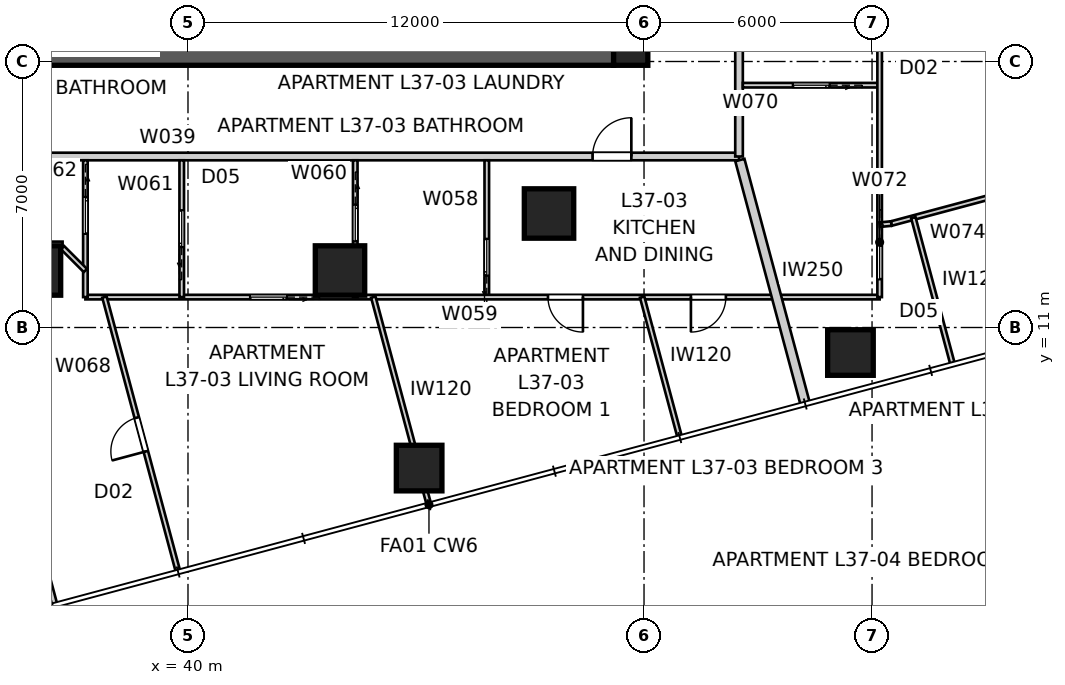
"""IFC4 building model, lengths in metres.
Left out: names, types, materials, properties, quantities, classifications, styles, units other than length and angle.
Written with IfcOpenShell. Run it as: python <this file> out.ifc"""

import sys

from ifc_helpers import new_model, si_unit, direction, frame, frame_2d, origin, origin_2d, place, context, subcontext, project, spatial, polyline, rectangle, outline, extrude, element, fill, save


model = new_model("IFC4")
c1 = context("Model", 3, precision=1e-05, world=origin(), true_north=direction((0.0, 1.0)))
c2 = subcontext(c1, "Body", "Model", "MODEL_VIEW")
j1 = project(units=[si_unit("LENGTHUNIT", "METRE"), si_unit("PLANEANGLEUNIT", "RADIAN")], contexts=[c1])
p1 = place(None, origin())
s1 = spatial("IfcSite", under=j1, at=p1, CompositionType="ELEMENT")
p2 = place(p1, origin())
s2 = spatial("IfcBuilding", under=s1, at=p2, CompositionType="ELEMENT")
p3 = place(p2, frame((0.0, 0.0, 135.4)))
s3 = spatial("IfcBuildingStorey", under=s2, at=p3, CompositionType="ELEMENT", Elevation=135.4)
p4 = place(p3, frame((51.2, 18.35, 0.0), z_axis=(0.0, 0.0, 1.0), x_axis=(-1.0, 0.0, 0.0)))
e1 = element("IfcWall", 1, at=p4, inside=s3, PredefinedType="SHEAR", context=c2, shape_type="SweptSolid", body=[
    extrude(outline(polyline([(0.0, -0.45), (22.4, -0.45), (22.4, -0.025), (22.85, -0.025), (22.85, 0.025), (22.4, 0.025), (22.4, 0.45), (0.0, 0.45), (0.0, 0.025), (-0.45, 0.025), (-0.45, -0.025), (0.0, -0.025), (0.0, -0.45)])), origin(), (0.0, 0.0, 1.0), 3.4),
])
p5 = place(p3, frame((51.65, 18.35, 0.0), z_axis=(0.0, 0.0, 1.0), x_axis=(1.0, 0.0, 0.0)))
e2 = element("IfcColumn", 2, at=p5, inside=s3, PredefinedType="COLUMN", context=c2, shape_type="SweptSolid", body=[
    extrude(rectangle(XDim=0.9, YDim=0.9, at=origin_2d()), origin(), (0.0, 0.0, 1.0), 3.4),
])
for number, where, z_axis, x_axis in (
    (3, (46.082, 7.301, 0.0), (0.0, 0.0, 1.0), (1.0, 0.0, 0.0)),
    (4, (57.432, 10.342, 0.0), (0.0, 0.0, 1.0), (1.0, 0.0, 0.0)),
):
    element("IfcColumn", number, at=place(p3, frame(where, z_axis=z_axis, x_axis=x_axis)), inside=s3, PredefinedType="COLUMN", context=c2, shape_type="SweptSolid", body=[
        extrude(rectangle(XDim=1.2, YDim=1.2, at=origin_2d()), origin(), (0.0, 0.0, 1.0), 3.2),
    ])
for number, where, z_axis, x_axis in (
    (5, (36.0, 12.5, 0.0), (0.0, 0.0, 1.0), (1.0, 0.0, 0.0)),
    (6, (44.0, 12.5, 0.0), (0.0, 0.0, 1.0), (1.0, 0.0, 0.0)),
    (7, (49.5, 14.0, 0.0), (0.0, 0.0, 1.0), (1.0, 0.0, 0.0)),
):
    element("IfcColumn", number, at=place(p3, frame(where, z_axis=z_axis, x_axis=x_axis)), inside=s3, PredefinedType="COLUMN", context=c2, shape_type="SweptSolid", body=[
        extrude(rectangle(XDim=1.3, YDim=1.3, at=origin_2d()), origin(), (0.0, 0.0, 1.0), 3.4),
    ])
p6 = place(p3, frame((25.5, 15.5, 0.0), z_axis=(0.0, 0.0, 1.0), x_axis=(1.0, 0.0, 0.0)))
e8 = element("IfcWall", 8, at=p6, inside=s3, PredefinedType="PARTITIONING", context=c2, shape_type="SweptSolid", body=[
    extrude(rectangle(XDim=29.0, YDim=0.2, at=frame_2d((14.5, 0.0))), origin(), (0.0, 0.0, 1.0), 3.2),
])
p7 = place(p6, frame((25.146, 0.0, 0.0)))
e9 = element("IfcOpeningElement", 9, at=p7, cuts=e8, PredefinedType="OPENING", context=c2, shape_type="SweptSolid", body=[
    extrude(rectangle(XDim=1.02, YDim=2.0, at=frame_2d((0.51, 1.0))), frame((0.0, 0.11, 0.0), z_axis=(0.0, -1.0, 0.0), x_axis=(1.0, 0.0, 0.0)), (0.0, 0.0, 1.0), 0.22),
])
p8 = place(p6, frame((1.761, 0.0, 0.0)))
e10 = element("IfcOpeningElement", 10, at=p8, cuts=e8, PredefinedType="OPENING", context=c2, shape_type="SweptSolid", body=[
    extrude(rectangle(XDim=1.02, YDim=2.34, at=frame_2d((0.51, 1.17))), frame((0.0, 0.11, 0.0), z_axis=(0.0, -1.0, 0.0), x_axis=(1.0, 0.0, 0.0)), (0.0, 0.0, 1.0), 0.22),
])
p9 = place(p3, frame((54.5, 15.5, 0.0), z_axis=(0.0, 0.0, 1.0), x_axis=(0.0, 1.0, 0.0)))
e11 = element("IfcWall", 11, at=p9, inside=s3, PredefinedType="PARTITIONING", context=c2, shape_type="SweptSolid", body=[
    extrude(rectangle(XDim=28.2, YDim=0.2, at=frame_2d((14.1, 0.0))), origin(), (0.0, 0.0, 1.0), 3.2),
])
p10 = place(p9, frame((21.527, 0.0, 0.0)))
e12 = element("IfcOpeningElement", 12, at=p10, cuts=e11, PredefinedType="OPENING", context=c2, shape_type="SweptSolid", body=[
    extrude(rectangle(XDim=1.02, YDim=2.34, at=frame_2d((0.51, 1.17))), frame((0.0, 0.11, 0.0), z_axis=(0.0, -1.0, 0.0), x_axis=(1.0, 0.0, 0.0)), (0.0, 0.0, 1.0), 0.22),
])
p11 = place(p9, frame((5.806, 0.0, 0.0)))
e13 = element("IfcOpeningElement", 13, at=p11, cuts=e11, PredefinedType="OPENING", context=c2, shape_type="SweptSolid", body=[
    extrude(rectangle(XDim=1.02, YDim=2.34, at=frame_2d((0.51, 1.17))), frame((0.0, 0.11, 0.0), z_axis=(0.0, -1.0, 0.0), x_axis=(1.0, 0.0, 0.0)), (0.0, 0.0, 1.0), 0.22),
])
p12 = place(p9, frame((26.127, 0.0, 0.0)))
e14 = element("IfcOpeningElement", 14, at=p12, cuts=e11, PredefinedType="OPENING", context=c2, shape_type="SweptSolid", body=[
    extrude(rectangle(XDim=1.02, YDim=2.34, at=frame_2d((0.51, 1.17))), frame((0.0, 0.11, 0.0), z_axis=(0.0, -1.0, 0.0), x_axis=(1.0, 0.0, 0.0)), (0.0, 0.0, 1.0), 0.22),
])
p13 = place(p3, frame((36.44, 3.682, 0.0), z_axis=(0.0, 0.0, 1.0), x_axis=(-0.258824223352, 0.965924438766, 0.0)))
e15 = element("IfcWall", 15, at=p13, inside=s3, PredefinedType="PARTITIONING", context=c2, shape_type="SweptSolid", body=[
    extrude(rectangle(XDim=12.138, YDim=0.25, at=frame_2d((6.069, 0.0))), origin(), (0.0, 0.0, 1.0), 3.2),
])
p14 = place(p3, frame((56.242, 8.988, 0.0), z_axis=(0.0, 0.0, 1.0), x_axis=(-0.25880587229, 0.965929355837, 0.0)))
e16 = element("IfcWall", 16, at=p14, inside=s3, PredefinedType="PARTITIONING", context=c2, shape_type="SweptSolid", body=[
    extrude(rectangle(XDim=6.645, YDim=0.25, at=frame_2d((3.322, 0.0))), origin(), (0.0, 0.0, 1.0), 3.2),
])
p15 = place(p3, frame((47.862, 11.8, 0.0), z_axis=(0.0, 0.0, 1.0), x_axis=(0.0, 1.0, 0.0)))
e17 = element("IfcWall", 17, at=p15, inside=s3, PredefinedType="PARTITIONING", context=c2, shape_type="SweptSolid", body=[
    extrude(rectangle(XDim=3.6, YDim=0.12, at=frame_2d((1.8, 0.0))), origin(), (0.0, 0.0, 1.0), 3.2),
])
p16 = place(p15, frame((0.57, 0.0, 0.0)))
e18 = element("IfcOpeningElement", 18, at=p16, cuts=e17, PredefinedType="OPENING", context=c2, shape_type="SweptSolid", body=[
    extrude(rectangle(XDim=0.96, YDim=2.1, at=frame_2d((0.48, 1.05))), frame((0.0, 0.07, 0.0), z_axis=(0.0, -1.0, 0.0), x_axis=(1.0, 0.0, 0.0)), (0.0, 0.0, 1.0), 0.14),
])
p17 = place(p3, frame((58.2, 11.8, 0.0), z_axis=(0.0, 0.0, 1.0), x_axis=(-1.0, 0.0, 0.0)))
e19 = element("IfcWall", 19, at=p17, inside=s3, PredefinedType="PARTITIONING", context=c2, shape_type="SweptSolid", body=[
    extrude(rectangle(XDim=20.9, YDim=0.12, at=frame_2d((10.45, 0.0))), origin(), (0.0, 0.0, 1.0), 3.2),
])
p18 = place(p17, frame((7.807, 0.0, 0.0)))
e20 = element("IfcOpeningElement", 20, at=p18, cuts=e19, PredefinedType="OPENING", context=c2, shape_type="SweptSolid", body=[
    extrude(rectangle(XDim=0.92, YDim=2.34, at=frame_2d((0.46, 1.17))), frame((0.0, 0.07, 0.0), z_axis=(0.0, -1.0, 0.0), x_axis=(1.0, 0.0, 0.0)), (0.0, 0.0, 1.0), 0.14),
])
p19 = place(p17, frame((4.046, 0.0, 0.0)))
e21 = element("IfcOpeningElement", 21, at=p19, cuts=e19, PredefinedType="OPENING", context=c2, shape_type="SweptSolid", body=[
    extrude(rectangle(XDim=0.92, YDim=2.34, at=frame_2d((0.46, 1.17))), frame((0.0, 0.07, 0.0), z_axis=(0.0, -1.0, 0.0), x_axis=(1.0, 0.0, 0.0)), (0.0, 0.0, 1.0), 0.14),
])
p20 = place(p17, frame((15.602, 0.0, 0.0)))
e22 = element("IfcOpeningElement", 22, at=p20, cuts=e19, PredefinedType="OPENING", context=c2, shape_type="SweptSolid", body=[
    extrude(rectangle(XDim=0.96, YDim=2.1, at=frame_2d((0.48, 1.05))), frame((0.0, 0.07, 0.0), z_axis=(0.0, -1.0, 0.0), x_axis=(1.0, 0.0, 0.0)), (0.0, 0.0, 1.0), 0.14),
])
p21 = place(p3, frame((44.401, 15.4, 0.0), z_axis=(0.0, 0.0, 1.0), x_axis=(0.0, -1.0, 0.0)))
e23 = element("IfcWall", 23, at=p21, inside=s3, PredefinedType="PARTITIONING", context=c2, shape_type="SweptSolid", body=[
    extrude(rectangle(XDim=3.6, YDim=0.12, at=frame_2d((1.8, 0.0))), origin(), (0.0, 0.0, 1.0), 3.2),
])
p22 = place(p21, frame((1.17, 0.0, 0.0)))
e24 = element("IfcOpeningElement", 24, at=p22, cuts=e23, PredefinedType="OPENING", context=c2, shape_type="SweptSolid", body=[
    extrude(rectangle(XDim=0.96, YDim=2.1, at=frame_2d((0.48, 1.05))), frame((0.0, 0.07, 0.0), z_axis=(0.0, -1.0, 0.0), x_axis=(1.0, 0.0, 0.0)), (0.0, 0.0, 1.0), 0.14),
])
p23 = place(p3, frame((39.835, 11.8, 0.0), z_axis=(0.0, 0.0, 1.0), x_axis=(0.0, 1.0, 0.0)))
e25 = element("IfcWall", 25, at=p23, inside=s3, PredefinedType="PARTITIONING", context=c2, shape_type="SweptSolid", body=[
    extrude(rectangle(XDim=3.6, YDim=0.12, at=frame_2d((1.8, 0.0))), origin(), (0.0, 0.0, 1.0), 3.2),
])
p24 = place(p23, frame((1.32, 0.0, 0.0)))
e26 = element("IfcOpeningElement", 26, at=p24, cuts=e25, PredefinedType="OPENING", context=c2, shape_type="SweptSolid", body=[
    extrude(rectangle(XDim=0.96, YDim=2.1, at=frame_2d((0.48, 1.05))), frame((0.0, 0.07, 0.0), z_axis=(0.0, -1.0, 0.0), x_axis=(1.0, 0.0, 0.0)), (0.0, 0.0, 1.0), 0.14),
])
p25 = place(p3, frame((37.3, 15.4, 0.0), z_axis=(0.0, 0.0, 1.0), x_axis=(0.0, -1.0, 0.0)))
e27 = element("IfcWall", 27, at=p25, inside=s3, PredefinedType="PARTITIONING", context=c2, shape_type="SweptSolid", body=[
    extrude(rectangle(XDim=3.6, YDim=0.12, at=frame_2d((1.8, 0.0))), origin(), (0.0, 0.0, 1.0), 3.2),
])
p26 = place(p25, frame((0.97, 0.0, 0.0)))
e28 = element("IfcOpeningElement", 28, at=p26, cuts=e27, PredefinedType="OPENING", context=c2, shape_type="SweptSolid", body=[
    extrude(rectangle(XDim=0.96, YDim=2.1, at=frame_2d((0.48, 1.05))), frame((0.0, 0.07, 0.0), z_axis=(0.0, -1.0, 0.0), x_axis=(1.0, 0.0, 0.0)), (0.0, 0.0, 1.0), 0.14),
])
p27 = place(p3, frame((37.3, 12.5, 0.0), z_axis=(0.0, 0.0, 1.0), x_axis=(-0.707106781187, 0.707106781187, 0.0)))
e29 = element("IfcWall", 29, at=p27, inside=s3, PredefinedType="PARTITIONING", context=c2, shape_type="SweptSolid", body=[
    extrude(rectangle(XDim=0.849, YDim=0.12, at=frame_2d((0.424, 0.0))), origin(), (0.0, 0.0, 1.0), 3.2),
])
p28 = place(p3, frame((36.7, 13.2, 0.0), z_axis=(0.0, 0.0, 1.0), x_axis=(-1.0, 0.0, 0.0)))
e30 = element("IfcWall", 30, at=p28, inside=s3, PredefinedType="PARTITIONING", context=c2, shape_type="SweptSolid", body=[
    extrude(rectangle(XDim=1.4, YDim=0.12, at=frame_2d((0.7, 0.0))), origin(), (0.0, 0.0, 1.0), 3.2),
])
p29 = place(p3, frame((44.877, 11.8, 0.0), z_axis=(0.0, 0.0, 1.0), x_axis=(0.258830937246, -0.96592263972, 0.0)))
e31 = element("IfcWall", 31, at=p29, inside=s3, PredefinedType="PARTITIONING", context=c2, shape_type="SweptSolid", body=[
    extrude(rectangle(XDim=5.618, YDim=0.12, at=frame_2d((2.809, 0.0))), origin(), (0.0, 0.0, 1.0), 3.2),
])
p30 = place(p3, frame((39.73, 4.605, 0.0), z_axis=(0.0, 0.0, 1.0), x_axis=(-0.258819087933, 0.965925814813, 0.0)))
e32 = element("IfcWall", 32, at=p30, inside=s3, PredefinedType="PARTITIONING", context=c2, shape_type="SweptSolid", body=[
    extrude(rectangle(XDim=7.449, YDim=0.12, at=frame_2d((3.725, 0.0))), origin(), (0.0, 0.0, 1.0), 3.2),
])
p31 = place(p30, frame((3.244, 0.0, 0.0)))
e33 = element("IfcOpeningElement", 33, at=p31, cuts=e32, PredefinedType="OPENING", context=c2, shape_type="SweptSolid", body=[
    extrude(rectangle(XDim=0.92, YDim=2.34, at=frame_2d((0.46, 1.17))), frame((0.0, 0.07, 0.0), z_axis=(0.0, -1.0, 0.0), x_axis=(1.0, 0.0, 0.0)), (0.0, 0.0, 1.0), 0.14),
])
p32 = place(p3, frame((51.951, 11.8, 0.0), z_axis=(0.0, 0.0, 1.0), x_axis=(0.258777977267, -0.965936829447, 0.0)))
e34 = element("IfcWall", 34, at=p32, inside=s3, PredefinedType="PARTITIONING", context=c2, shape_type="SweptSolid", body=[
    extrude(rectangle(XDim=3.787, YDim=0.12, at=frame_2d((1.894, 0.0))), origin(), (0.0, 0.0, 1.0), 3.2),
])
p33 = place(p3, frame((58.2, 17.377, 0.0), z_axis=(0.0, 0.0, 1.0), x_axis=(-1.0, 0.0, 0.0)))
e35 = element("IfcWall", 35, at=p33, inside=s3, PredefinedType="PARTITIONING", context=c2, shape_type="SweptSolid", body=[
    extrude(rectangle(XDim=3.6, YDim=0.12, at=frame_2d((1.8, 0.0))), origin(), (0.0, 0.0, 1.0), 3.2),
])
p34 = place(p33, frame((1.32, 0.0, 0.0)))
e36 = element("IfcOpeningElement", 36, at=p34, cuts=e35, PredefinedType="OPENING", context=c2, shape_type="SweptSolid", body=[
    extrude(rectangle(XDim=0.96, YDim=2.1, at=frame_2d((0.48, 1.05))), frame((0.0, 0.07, 0.0), z_axis=(0.0, -1.0, 0.0), x_axis=(1.0, 0.0, 0.0)), (0.0, 0.0, 1.0), 0.14),
])
p35 = place(p3, frame((58.2, 48.2, 0.0), z_axis=(0.0, 0.0, 1.0), x_axis=(0.0, -1.0, 0.0)))
e37 = element("IfcWall", 37, at=p35, inside=s3, PredefinedType="PARTITIONING", context=c2, shape_type="SweptSolid", body=[
    extrude(rectangle(XDim=33.512, YDim=0.12, at=frame_2d((16.756, 0.0))), origin(), (0.0, 0.0, 1.0), 2.399),
])
p36 = place(p35, frame((11.441, 0.0, 0.0)))
e38 = element("IfcOpeningElement", 38, at=p36, cuts=e37, PredefinedType="OPENING", context=c2, shape_type="SweptSolid", body=[
    extrude(rectangle(XDim=0.92, YDim=2.34, at=frame_2d((0.46, 1.17))), frame((0.0, 0.07, 0.0), z_axis=(0.0, -1.0, 0.0), x_axis=(1.0, 0.0, 0.0)), (0.0, 0.0, 1.0), 0.14),
])
p37 = place(p35, frame((7.583, 0.0, 0.0)))
e39 = element("IfcOpeningElement", 39, at=p37, cuts=e37, PredefinedType="OPENING", context=c2, shape_type="SweptSolid", body=[
    extrude(rectangle(XDim=0.92, YDim=2.34, at=frame_2d((0.46, 1.17))), frame((0.0, 0.07, 0.0), z_axis=(0.0, -1.0, 0.0), x_axis=(1.0, 0.0, 0.0)), (0.0, 0.0, 1.0), 0.14),
])
p38 = place(p35, frame((25.269, 0.0, 0.0)))
e40 = element("IfcOpeningElement", 40, at=p38, cuts=e37, PredefinedType="OPENING", context=c2, shape_type="SweptSolid", body=[
    extrude(rectangle(XDim=0.92, YDim=2.34, at=frame_2d((0.46, 1.17))), frame((0.0, 0.07, 0.0), z_axis=(0.0, -1.0, 0.0), x_axis=(1.0, 0.0, 0.0)), (0.0, 0.0, 1.0), 0.14),
])
p39 = place(p35, frame((28.662, 0.0, 0.0)))
e41 = element("IfcOpeningElement", 41, at=p39, cuts=e37, PredefinedType="OPENING", context=c2, shape_type="SweptSolid", body=[
    extrude(rectangle(XDim=0.92, YDim=2.34, at=frame_2d((0.46, 1.17))), frame((0.0, 0.07, 0.0), z_axis=(0.0, -1.0, 0.0), x_axis=(1.0, 0.0, 0.0)), (0.0, 0.0, 1.0), 0.14),
])
p40 = place(p35, frame((4.15, 0.0, 0.0)))
e42 = element("IfcOpeningElement", 42, at=p40, cuts=e37, PredefinedType="OPENING", context=c2, shape_type="SweptSolid", body=[
    extrude(rectangle(XDim=0.92, YDim=2.34, at=frame_2d((0.46, 1.17))), frame((0.0, 0.07, 0.0), z_axis=(0.0, -1.0, 0.0), x_axis=(1.0, 0.0, 0.0)), (0.0, 0.0, 1.0), 0.14),
])
p41 = place(p3, frame((65.069, 15.494, 0.0), z_axis=(0.0, 0.0, 1.0), x_axis=(-0.965922865286, -0.258830095464, 0.0)))
e43 = element("IfcWall", 43, at=p41, inside=s3, PredefinedType="PARTITIONING", context=c2, shape_type="SweptSolid", body=[
    extrude(rectangle(XDim=6.793, YDim=0.12, at=frame_2d((3.396, 0.0))), origin(), (0.0, 0.0, 1.0), 3.2),
])
p42 = place(p41, frame((2.617, 0.0, 0.0)))
e44 = element("IfcOpeningElement", 44, at=p42, cuts=e43, PredefinedType="OPENING", context=c2, shape_type="SweptSolid", body=[
    extrude(rectangle(XDim=0.92, YDim=2.34, at=frame_2d((0.46, 1.17))), frame((0.0, 0.07, 0.0), z_axis=(0.0, -1.0, 0.0), x_axis=(1.0, 0.0, 0.0)), (0.0, 0.0, 1.0), 0.14),
])
p43 = place(p3, frame((60.111, 10.066, 0.0), z_axis=(0.0, 0.0, 1.0), x_axis=(-0.258863452657, 0.965913926227, 0.0)))
e45 = element("IfcWall", 45, at=p43, inside=s3, PredefinedType="PARTITIONING", context=c2, shape_type="SweptSolid", body=[
    extrude(rectangle(XDim=3.96, YDim=0.12, at=frame_2d((1.98, 0.0))), origin(), (0.0, 0.0, 1.0), 3.2),
])
p44 = place(p3, frame((58.2, 14.688, 0.0), z_axis=(0.0, 0.0, 1.0), x_axis=(0.0, -1.0, 0.0)))
e46 = element("IfcWall", 46, at=p44, inside=s3, PredefinedType="PARTITIONING", context=c2, shape_type="SweptSolid", body=[
    extrude(rectangle(XDim=2.887, YDim=0.12, at=frame_2d((1.444, 0.0))), origin(), (0.0, 0.0, 1.0), 3.2),
])
p45 = place(p44, frame((1.455, 0.0, 0.0)))
e47 = element("IfcOpeningElement", 47, at=p45, cuts=e46, PredefinedType="OPENING", context=c2, shape_type="SweptSolid", body=[
    extrude(rectangle(XDim=0.96, YDim=2.1, at=frame_2d((0.48, 1.05))), frame((0.0, 0.07, 0.0), z_axis=(0.0, -1.0, 0.0), x_axis=(1.0, 0.0, 0.0)), (0.0, 0.0, 1.0), 0.14),
])
p46 = place(p3, frame((58.507, 13.736, 0.0), z_axis=(0.0, 0.0, 1.0), x_axis=(-0.995169554704, -0.09817106188, 0.0)))
e48 = element("IfcWall", 48, at=p46, inside=s3, PredefinedType="PARTITIONING", context=c2, shape_type="SweptSolid", body=[
    extrude(rectangle(XDim=0.308, YDim=0.12, at=frame_2d((0.154, 0.0))), origin(), (0.0, 0.0, 1.0), 3.2),
])
p47 = place(p7, origin())
e49 = element("IfcDoor", 49, at=p47, inside=s3, OperationType="SINGLE_SWING_RIGHT", PredefinedType="DOOR", context=c2, shape_type="SweptSolid", body=[
    extrude(rectangle(XDim=1.02, YDim=2.0, at=frame_2d((0.51, 1.0))), frame((0.0, 0.025, 0.0), z_axis=(0.0, -1.0, 0.0), x_axis=(1.0, 0.0, 0.0)), (0.0, 0.0, 1.0), 0.05),
])
fill(e9, e49)
p48 = place(p18, origin())
e50 = element("IfcDoor", 50, at=p48, inside=s3, OperationType="SINGLE_SWING_LEFT", PredefinedType="DOOR", context=c2, shape_type="SweptSolid", body=[
    extrude(rectangle(XDim=0.92, YDim=2.34, at=frame_2d((0.46, 1.17))), frame((0.0, 0.025, 0.0), z_axis=(0.0, -1.0, 0.0), x_axis=(1.0, 0.0, 0.0)), (0.0, 0.0, 1.0), 0.05),
])
fill(e20, e50)
p49 = place(p16, origin())
e51 = element("IfcDoor", 51, at=p49, inside=s3, OperationType="SLIDING_TO_LEFT", PredefinedType="DOOR", context=c2, shape_type="SweptSolid", body=[
    extrude(rectangle(XDim=0.96, YDim=2.1, at=frame_2d((0.48, 1.05))), frame((0.0, 0.025, 0.0), z_axis=(0.0, -1.0, 0.0), x_axis=(1.0, 0.0, 0.0)), (0.0, 0.0, 1.0), 0.05),
])
fill(e18, e51)
p50 = place(p19, origin())
e52 = element("IfcDoor", 52, at=p50, inside=s3, OperationType="SINGLE_SWING_RIGHT", PredefinedType="DOOR", context=c2, shape_type="SweptSolid", body=[
    extrude(rectangle(XDim=0.92, YDim=2.34, at=frame_2d((0.46, 1.17))), frame((0.0, 0.025, 0.0), z_axis=(0.0, -1.0, 0.0), x_axis=(1.0, 0.0, 0.0)), (0.0, 0.0, 1.0), 0.05),
])
fill(e21, e52)
p51 = place(p34, origin())
e53 = element("IfcDoor", 53, at=p51, inside=s3, OperationType="SLIDING_TO_LEFT", PredefinedType="DOOR", context=c2, shape_type="SweptSolid", body=[
    extrude(rectangle(XDim=0.96, YDim=2.1, at=frame_2d((0.48, 1.05))), frame((0.0, 0.025, 0.0), z_axis=(0.0, -1.0, 0.0), x_axis=(1.0, 0.0, 0.0)), (0.0, 0.0, 1.0), 0.05),
])
fill(e36, e53)
p52 = place(p22, origin())
e54 = element("IfcDoor", 54, at=p52, inside=s3, OperationType="SLIDING_TO_LEFT", PredefinedType="DOOR", context=c2, shape_type="SweptSolid", body=[
    extrude(rectangle(XDim=0.96, YDim=2.1, at=frame_2d((0.48, 1.05))), frame((0.0, 0.025, 0.0), z_axis=(0.0, -1.0, 0.0), x_axis=(1.0, 0.0, 0.0)), (0.0, 0.0, 1.0), 0.05),
])
fill(e24, e54)
p53 = place(p45, origin())
e55 = element("IfcDoor", 55, at=p53, inside=s3, OperationType="SLIDING_TO_LEFT", PredefinedType="DOOR", context=c2, shape_type="SweptSolid", body=[
    extrude(rectangle(XDim=0.96, YDim=2.1, at=frame_2d((0.48, 1.05))), frame((0.0, 0.025, 0.0), z_axis=(0.0, -1.0, 0.0), x_axis=(1.0, 0.0, 0.0)), (0.0, 0.0, 1.0), 0.05),
])
fill(e47, e55)
p54 = place(p20, origin())
e56 = element("IfcDoor", 56, at=p54, inside=s3, OperationType="SLIDING_TO_LEFT", PredefinedType="DOOR", context=c2, shape_type="SweptSolid", body=[
    extrude(rectangle(XDim=0.96, YDim=2.1, at=frame_2d((0.48, 1.05))), frame((0.0, 0.025, 0.0), z_axis=(0.0, -1.0, 0.0), x_axis=(1.0, 0.0, 0.0)), (0.0, 0.0, 1.0), 0.05),
])
fill(e22, e56)
p55 = place(p24, origin())
e57 = element("IfcDoor", 57, at=p55, inside=s3, OperationType="SLIDING_TO_LEFT", PredefinedType="DOOR", context=c2, shape_type="SweptSolid", body=[
    extrude(rectangle(XDim=0.96, YDim=2.1, at=frame_2d((0.48, 1.05))), frame((0.0, 0.025, 0.0), z_axis=(0.0, -1.0, 0.0), x_axis=(1.0, 0.0, 0.0)), (0.0, 0.0, 1.0), 0.05),
])
fill(e26, e57)
p56 = place(p31, origin())
e58 = element("IfcDoor", 58, at=p56, inside=s3, OperationType="SINGLE_SWING_LEFT", PredefinedType="DOOR", context=c2, shape_type="SweptSolid", body=[
    extrude(rectangle(XDim=0.92, YDim=2.34, at=frame_2d((0.46, 1.17))), frame((0.0, 0.025, 0.0), z_axis=(0.0, -1.0, 0.0), x_axis=(1.0, 0.0, 0.0)), (0.0, 0.0, 1.0), 0.05),
])
fill(e33, e58)
p57 = place(p26, origin())
e59 = element("IfcDoor", 59, at=p57, inside=s3, OperationType="SLIDING_TO_LEFT", PredefinedType="DOOR", context=c2, shape_type="SweptSolid", body=[
    extrude(rectangle(XDim=0.96, YDim=2.1, at=frame_2d((0.48, 1.05))), frame((0.0, 0.025, 0.0), z_axis=(0.0, -1.0, 0.0), x_axis=(1.0, 0.0, 0.0)), (0.0, 0.0, 1.0), 0.05),
])
fill(e28, e59)
save(model, sys.argv[1])
